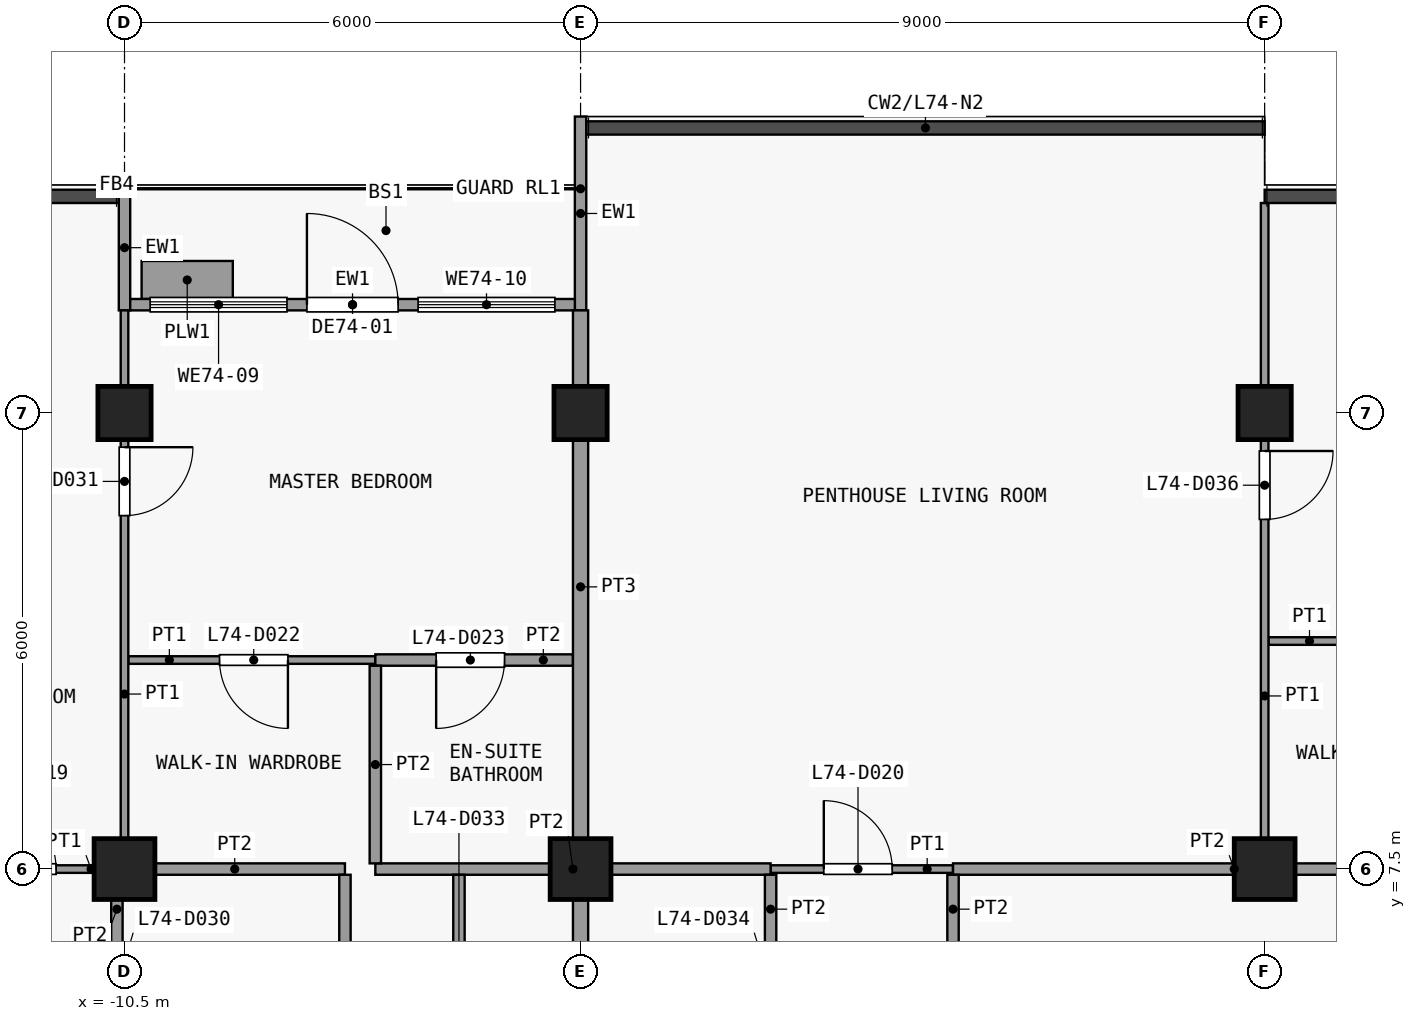
"""IFC4 building model, lengths in metres.
Left out: names, types, materials, properties, quantities, classifications, styles, units other than length and angle.
Written with IfcOpenShell. Run it as: python <this file> out.ifc"""

import sys

from ifc_helpers import new_model, si_unit, direction, frame, frame_2d, origin, origin_2d, place, context, subcontext, project, spatial, rectangle, extrude, element, fill, save


model = new_model("IFC4")
c1 = context("Model", 3, precision=1e-05, world=origin(), true_north=direction((0.0, 1.0)))
c2 = subcontext(c1, "Body", "Model", "MODEL_VIEW")
j1 = project(units=[si_unit("LENGTHUNIT", "METRE"), si_unit("PLANEANGLEUNIT", "RADIAN")], contexts=[c1])
p1 = place(None, origin())
s1 = spatial("IfcSite", under=j1, at=p1, CompositionType="ELEMENT")
p2 = place(p1, origin())
s2 = spatial("IfcBuilding", under=s1, at=p2, CompositionType="ELEMENT")
p3 = place(p2, frame((0.0, 0.0, 291.5)))
s3 = spatial("IfcBuildingStorey", under=s2, at=p3, CompositionType="ELEMENT", Elevation=291.5)
p4 = place(p3, frame((-10.5, 7.5, 0.0), z_axis=(0.0, 0.0, 1.0), x_axis=(1.0, 0.0, 0.0)))
e1 = element("IfcColumn", 1, at=p4, inside=s3, PredefinedType="COLUMN", context=c2, shape_type="SweptSolid", body=[
    extrude(rectangle(XDim=0.8, YDim=0.8, at=origin_2d()), origin(), (0.0, 0.0, 1.0), 3.6),
])
p5 = place(p3, frame((-10.5, 13.5, 0.0), z_axis=(0.0, 0.0, 1.0), x_axis=(1.0, 0.0, 0.0)))
e2 = element("IfcColumn", 2, at=p5, inside=s3, PredefinedType="COLUMN", context=c2, shape_type="SweptSolid", body=[
    extrude(rectangle(XDim=0.7, YDim=0.7, at=origin_2d()), origin(), (0.0, 0.0, 1.0), 3.6),
])
p6 = place(p3, frame((-4.5, 7.5, 0.0), z_axis=(0.0, 0.0, 1.0), x_axis=(1.0, 0.0, 0.0)))
e3 = element("IfcColumn", 3, at=p6, inside=s3, PredefinedType="COLUMN", context=c2, shape_type="SweptSolid", body=[
    extrude(rectangle(XDim=0.8, YDim=0.8, at=origin_2d()), origin(), (0.0, 0.0, 1.0), 3.6),
])
p7 = place(p3, frame((-4.5, 13.5, 0.0), z_axis=(0.0, 0.0, 1.0), x_axis=(1.0, 0.0, 0.0)))
e4 = element("IfcColumn", 4, at=p7, inside=s3, PredefinedType="COLUMN", context=c2, shape_type="SweptSolid", body=[
    extrude(rectangle(XDim=0.7, YDim=0.7, at=origin_2d()), origin(), (0.0, 0.0, 1.0), 3.6),
])
p8 = place(p3, frame((4.5, 7.5, 0.0), z_axis=(0.0, 0.0, 1.0), x_axis=(1.0, 0.0, 0.0)))
e5 = element("IfcColumn", 5, at=p8, inside=s3, PredefinedType="COLUMN", context=c2, shape_type="SweptSolid", body=[
    extrude(rectangle(XDim=0.8, YDim=0.8, at=origin_2d()), origin(), (0.0, 0.0, 1.0), 3.6),
])
p9 = place(p3, frame((4.5, 13.5, 0.0), z_axis=(0.0, 0.0, 1.0), x_axis=(1.0, 0.0, 0.0)))
e6 = element("IfcColumn", 6, at=p9, inside=s3, PredefinedType="COLUMN", context=c2, shape_type="SweptSolid", body=[
    extrude(rectangle(XDim=0.7, YDim=0.7, at=origin_2d()), origin(), (0.0, 0.0, 1.0), 3.6),
])
p10 = place(p3, frame((-10.5, 14.85, 0.0), z_axis=(0.0, 0.0, 1.0), x_axis=(0.0, 1.0, 0.0)))
e7 = element("IfcWall", 7, at=p10, inside=s3, PredefinedType="SOLIDWALL", context=c2, shape_type="SweptSolid", body=[
    extrude(rectangle(XDim=1.65, YDim=0.15, at=frame_2d((0.825, 0.0))), origin(), (0.0, 0.0, 1.0), 3.3),
])
p11 = place(p3, frame((-4.5, 14.85, 0.0), z_axis=(0.0, 0.0, 1.0), x_axis=(0.0, 1.0, 0.0)))
e8 = element("IfcWall", 8, at=p11, inside=s3, PredefinedType="SOLIDWALL", context=c2, shape_type="SweptSolid", body=[
    extrude(rectangle(XDim=2.55, YDim=0.15, at=frame_2d((1.275, 0.0))), origin(), (0.0, 0.0, 1.0), 3.3),
])
p12 = place(p3, frame((-10.425, 14.925, 0.0), z_axis=(0.0, 0.0, 1.0), x_axis=(1.0, 0.0, 0.0)))
e9 = element("IfcWall", 9, at=p12, inside=s3, PredefinedType="SOLIDWALL", context=c2, shape_type="SweptSolid", body=[
    extrude(rectangle(XDim=5.85, YDim=0.15, at=frame_2d((2.925, 0.0))), origin(), (0.0, 0.0, 1.0), 3.3),
])
p13 = place(p12, frame((2.325, 0.0, 0.0)))
e10 = element("IfcOpeningElement", 10, at=p13, cuts=e9, PredefinedType="OPENING", context=c2, shape_type="SweptSolid", body=[
    extrude(rectangle(XDim=1.2, YDim=2.4, at=frame_2d((0.6, 1.2))), frame((0.0, 0.085, 0.0), z_axis=(0.0, -1.0, 0.0), x_axis=(1.0, 0.0, 0.0)), (0.0, 0.0, 1.0), 0.17),
])
p14 = place(p12, frame((0.262, 0.0, 0.9)))
e11 = element("IfcOpeningElement", 11, at=p14, cuts=e9, PredefinedType="OPENING", context=c2, shape_type="SweptSolid", body=[
    extrude(rectangle(XDim=1.8, YDim=2.1, at=frame_2d((0.9, 1.05))), frame((0.0, 0.085, 0.0), z_axis=(0.0, -1.0, 0.0), x_axis=(1.0, 0.0, 0.0)), (0.0, 0.0, 1.0), 0.17),
])
p15 = place(p12, frame((3.788, 0.0, 0.9)))
e12 = element("IfcOpeningElement", 12, at=p15, cuts=e9, PredefinedType="OPENING", context=c2, shape_type="SweptSolid", body=[
    extrude(rectangle(XDim=1.8, YDim=2.1, at=frame_2d((0.9, 1.05))), frame((0.0, 0.085, 0.0), z_axis=(0.0, -1.0, 0.0), x_axis=(1.0, 0.0, 0.0)), (0.0, 0.0, 1.0), 0.17),
])
p16 = place(p3, frame((-10.275, 15.25, 0.0), z_axis=(0.0, 0.0, 1.0), x_axis=(1.0, 0.0, 0.0)))
e13 = element("IfcWall", 13, at=p16, inside=s3, PredefinedType="USERDEFINED", context=c2, shape_type="SweptSolid", body=[
    extrude(rectangle(XDim=1.2, YDim=0.5, at=frame_2d((0.6, 0.0))), origin(), (0.0, 0.0, 1.0), 0.9),
])
p17 = place(p3, frame((-13.0, 7.5, 0.0), z_axis=(0.0, 0.0, 1.0), x_axis=(1.0, 0.0, 0.0)))
e14 = element("IfcWall", 14, at=p17, inside=s3, PredefinedType="PARTITIONING", context=c2, shape_type="SweptSolid", body=[
    extrude(rectangle(XDim=2.4, YDim=0.1, at=frame_2d((1.2, 0.0))), origin(), (0.0, 0.0, 1.0), 3.3),
])
p18 = place(p17, frame((0.7, 0.0, 0.0)))
e15 = element("IfcOpeningElement", 15, at=p18, cuts=e14, PredefinedType="OPENING", context=c2, shape_type="SweptSolid", body=[
    extrude(rectangle(XDim=0.9, YDim=2.1, at=frame_2d((0.45, 1.05))), frame((0.0, 0.06, 0.0), z_axis=(0.0, -1.0, 0.0), x_axis=(1.0, 0.0, 0.0)), (0.0, 0.0, 1.0), 0.12),
])
p19 = place(p3, frame((-2.0, 7.5, 0.0), z_axis=(0.0, 0.0, 1.0), x_axis=(1.0, 0.0, 0.0)))
e16 = element("IfcWall", 16, at=p19, inside=s3, PredefinedType="PARTITIONING", context=c2, shape_type="SweptSolid", body=[
    extrude(rectangle(XDim=2.4, YDim=0.1, at=frame_2d((1.2, 0.0))), origin(), (0.0, 0.0, 1.0), 3.3),
])
p20 = place(p19, frame((0.7, 0.0, 0.0)))
e17 = element("IfcOpeningElement", 17, at=p20, cuts=e16, PredefinedType="OPENING", context=c2, shape_type="SweptSolid", body=[
    extrude(rectangle(XDim=0.9, YDim=2.1, at=frame_2d((0.45, 1.05))), frame((0.0, 0.06, 0.0), z_axis=(0.0, -1.0, 0.0), x_axis=(1.0, 0.0, 0.0)), (0.0, 0.0, 1.0), 0.12),
])
p21 = place(p3, frame((-10.5, 7.5, 0.0), z_axis=(0.0, 0.0, 1.0), x_axis=(1.0, 0.0, 0.0)))
e18 = element("IfcWall", 18, at=p21, inside=s3, PredefinedType="PARTITIONING", context=c2, shape_type="SweptSolid", body=[
    extrude(rectangle(XDim=2.9, YDim=0.15, at=frame_2d((1.45, 0.0))), origin(), (0.0, 0.0, 1.0), 3.3),
])
p22 = place(p3, frame((-7.2, 7.5, 0.0), z_axis=(0.0, 0.0, 1.0), x_axis=(1.0, 0.0, 0.0)))
e19 = element("IfcWall", 19, at=p22, inside=s3, PredefinedType="PARTITIONING", context=c2, shape_type="SweptSolid", body=[
    extrude(rectangle(XDim=5.2, YDim=0.15, at=frame_2d((2.6, 0.0))), origin(), (0.0, 0.0, 1.0), 3.3),
])
p23 = place(p3, frame((0.4, 7.5, 0.0), z_axis=(0.0, 0.0, 1.0), x_axis=(1.0, 0.0, 0.0)))
e20 = element("IfcWall", 20, at=p23, inside=s3, PredefinedType="PARTITIONING", context=c2, shape_type="SweptSolid", body=[
    extrude(rectangle(XDim=7.4, YDim=0.15, at=frame_2d((3.7, 0.0))), origin(), (0.0, 0.0, 1.0), 3.3),
])
p24 = place(p3, frame((-10.45, 10.25, 0.0), z_axis=(0.0, 0.0, 1.0), x_axis=(1.0, 0.0, 0.0)))
e21 = element("IfcWall", 21, at=p24, inside=s3, PredefinedType="PARTITIONING", context=c2, shape_type="SweptSolid", body=[
    extrude(rectangle(XDim=3.25, YDim=0.1, at=frame_2d((1.625, 0.0))), origin(), (0.0, 0.0, 1.0), 3.3),
])
p25 = place(p24, frame((1.2, 0.0, 0.0)))
e22 = element("IfcOpeningElement", 22, at=p25, cuts=e21, PredefinedType="OPENING", context=c2, shape_type="SweptSolid", body=[
    extrude(rectangle(XDim=0.9, YDim=2.1, at=frame_2d((0.45, 1.05))), frame((0.0, 0.06, 0.0), z_axis=(0.0, -1.0, 0.0), x_axis=(1.0, 0.0, 0.0)), (0.0, 0.0, 1.0), 0.12),
])
p26 = place(p3, frame((-7.2, 10.25, 0.0), z_axis=(0.0, 0.0, 1.0), x_axis=(1.0, 0.0, 0.0)))
e23 = element("IfcWall", 23, at=p26, inside=s3, PredefinedType="PARTITIONING", context=c2, shape_type="SweptSolid", body=[
    extrude(rectangle(XDim=2.6, YDim=0.15, at=frame_2d((1.3, 0.0))), origin(), (0.0, 0.0, 1.0), 3.3),
])
p27 = place(p26, frame((0.8, 0.0, 0.0)))
e24 = element("IfcOpeningElement", 24, at=p27, cuts=e23, PredefinedType="OPENING", context=c2, shape_type="SweptSolid", body=[
    extrude(rectangle(XDim=0.9, YDim=2.1, at=frame_2d((0.45, 1.05))), frame((0.0, 0.085, 0.0), z_axis=(0.0, -1.0, 0.0), x_axis=(1.0, 0.0, 0.0)), (0.0, 0.0, 1.0), 0.17),
])
p28 = place(p3, frame((4.55, 10.5, 0.0), z_axis=(0.0, 0.0, 1.0), x_axis=(1.0, 0.0, 0.0)))
e25 = element("IfcWall", 25, at=p28, inside=s3, PredefinedType="PARTITIONING", context=c2, shape_type="SweptSolid", body=[
    extrude(rectangle(XDim=3.25, YDim=0.1, at=frame_2d((1.625, 0.0))), origin(), (0.0, 0.0, 1.0), 3.3),
])
p29 = place(p28, frame((1.2, 0.0, 0.0)))
e26 = element("IfcOpeningElement", 26, at=p29, cuts=e25, PredefinedType="OPENING", context=c2, shape_type="SweptSolid", body=[
    extrude(rectangle(XDim=0.9, YDim=2.1, at=frame_2d((0.45, 1.05))), frame((0.0, 0.06, 0.0), z_axis=(0.0, -1.0, 0.0), x_axis=(1.0, 0.0, 0.0)), (0.0, 0.0, 1.0), 0.12),
])
p30 = place(p3, frame((-10.6, 4.6, 0.0), z_axis=(0.0, 0.0, 1.0), x_axis=(0.0, 1.0, 0.0)))
e27 = element("IfcWall", 27, at=p30, inside=s3, PredefinedType="PARTITIONING", context=c2, shape_type="SweptSolid", body=[
    extrude(rectangle(XDim=2.825, YDim=0.15, at=frame_2d((1.413, 0.0))), origin(), (0.0, 0.0, 1.0), 3.3),
])
p31 = place(p30, frame((0.9, 0.0, 0.0)))
e28 = element("IfcOpeningElement", 28, at=p31, cuts=e27, PredefinedType="OPENING", context=c2, shape_type="SweptSolid", body=[
    extrude(rectangle(XDim=0.9, YDim=2.1, at=frame_2d((0.45, 1.05))), frame((0.0, 0.085, 0.0), z_axis=(0.0, -1.0, 0.0), x_axis=(1.0, 0.0, 0.0)), (0.0, 0.0, 1.0), 0.17),
])
p32 = place(p3, frame((-10.5, 7.575, 0.0), z_axis=(0.0, 0.0, 1.0), x_axis=(0.0, 1.0, 0.0)))
e29 = element("IfcWall", 29, at=p32, inside=s3, PredefinedType="PARTITIONING", context=c2, shape_type="SweptSolid", body=[
    extrude(rectangle(XDim=7.275, YDim=0.1, at=frame_2d((3.638, 0.0))), origin(), (0.0, 0.0, 1.0), 3.3),
])
p33 = place(p32, frame((4.575, 0.0, 0.0)))
e30 = element("IfcOpeningElement", 30, at=p33, cuts=e29, PredefinedType="OPENING", context=c2, shape_type="SweptSolid", body=[
    extrude(rectangle(XDim=0.9, YDim=2.1, at=frame_2d((0.45, 1.05))), frame((0.0, 0.06, 0.0), z_axis=(0.0, -1.0, 0.0), x_axis=(1.0, 0.0, 0.0)), (0.0, 0.0, 1.0), 0.12),
])
p34 = place(p3, frame((-7.6, 4.6, 0.0), z_axis=(0.0, 0.0, 1.0), x_axis=(0.0, 1.0, 0.0)))
e31 = element("IfcWall", 31, at=p34, inside=s3, PredefinedType="PARTITIONING", context=c2, shape_type="SweptSolid", body=[
    extrude(rectangle(XDim=2.825, YDim=0.15, at=frame_2d((1.413, 0.0))), origin(), (0.0, 0.0, 1.0), 3.3),
])
p35 = place(p34, frame((1.0, 0.0, 0.0)))
e32 = element("IfcOpeningElement", 32, at=p35, cuts=e31, PredefinedType="OPENING", context=c2, shape_type="SweptSolid", body=[
    extrude(rectangle(XDim=0.9, YDim=2.1, at=frame_2d((0.45, 1.05))), frame((0.0, 0.085, 0.0), z_axis=(0.0, -1.0, 0.0), x_axis=(1.0, 0.0, 0.0)), (0.0, 0.0, 1.0), 0.17),
])
p36 = place(p3, frame((-7.2, 7.575, 0.0), z_axis=(0.0, 0.0, 1.0), x_axis=(0.0, 1.0, 0.0)))
e33 = element("IfcWall", 33, at=p36, inside=s3, PredefinedType="PARTITIONING", context=c2, shape_type="SweptSolid", body=[
    extrude(rectangle(XDim=2.6, YDim=0.15, at=frame_2d((1.3, 0.0))), origin(), (0.0, 0.0, 1.0), 3.3),
])
p37 = place(p3, frame((-6.1, 4.6, 0.0), z_axis=(0.0, 0.0, 1.0), x_axis=(0.0, 1.0, 0.0)))
e34 = element("IfcWall", 34, at=p37, inside=s3, PredefinedType="PARTITIONING", context=c2, shape_type="SweptSolid", body=[
    extrude(rectangle(XDim=2.825, YDim=0.15, at=frame_2d((1.413, 0.0))), origin(), (0.0, 0.0, 1.0), 3.3),
])
p38 = place(p37, frame((1.0, 0.0, 0.0)))
e35 = element("IfcOpeningElement", 35, at=p38, cuts=e34, PredefinedType="OPENING", context=c2, shape_type="SweptSolid", body=[
    extrude(rectangle(XDim=0.9, YDim=2.1, at=frame_2d((0.45, 1.05))), frame((0.0, 0.085, 0.0), z_axis=(0.0, -1.0, 0.0), x_axis=(1.0, 0.0, 0.0)), (0.0, 0.0, 1.0), 0.17),
])
p39 = place(p3, frame((-4.5, 4.6, 0.0), z_axis=(0.0, 0.0, 1.0), x_axis=(0.0, 1.0, 0.0)))
e36 = element("IfcWall", 36, at=p39, inside=s3, PredefinedType="PARTITIONING", context=c2, shape_type="SweptSolid", body=[
    extrude(rectangle(XDim=2.825, YDim=0.2, at=frame_2d((1.413, 0.0))), origin(), (0.0, 0.0, 1.0), 3.3),
])
p40 = place(p3, frame((-4.5, 7.575, 0.0), z_axis=(0.0, 0.0, 1.0), x_axis=(0.0, 1.0, 0.0)))
e37 = element("IfcWall", 37, at=p40, inside=s3, PredefinedType="PARTITIONING", context=c2, shape_type="SweptSolid", body=[
    extrude(rectangle(XDim=7.275, YDim=0.2, at=frame_2d((3.638, 0.0))), origin(), (0.0, 0.0, 1.0), 3.3),
])
p41 = place(p3, frame((-2.0, 4.6, 0.0), z_axis=(0.0, 0.0, 1.0), x_axis=(0.0, 1.0, 0.0)))
e38 = element("IfcWall", 38, at=p41, inside=s3, PredefinedType="PARTITIONING", context=c2, shape_type="SweptSolid", body=[
    extrude(rectangle(XDim=2.825, YDim=0.15, at=frame_2d((1.413, 0.0))), origin(), (0.0, 0.0, 1.0), 3.3),
])
p42 = place(p41, frame((0.9, 0.0, 0.0)))
e39 = element("IfcOpeningElement", 39, at=p42, cuts=e38, PredefinedType="OPENING", context=c2, shape_type="SweptSolid", body=[
    extrude(rectangle(XDim=0.9, YDim=2.1, at=frame_2d((0.45, 1.05))), frame((0.0, 0.085, 0.0), z_axis=(0.0, -1.0, 0.0), x_axis=(1.0, 0.0, 0.0)), (0.0, 0.0, 1.0), 0.17),
])
p43 = place(p3, frame((0.4, 4.6, 0.0), z_axis=(0.0, 0.0, 1.0), x_axis=(0.0, 1.0, 0.0)))
e40 = element("IfcWall", 40, at=p43, inside=s3, PredefinedType="PARTITIONING", context=c2, shape_type="SweptSolid", body=[
    extrude(rectangle(XDim=2.825, YDim=0.15, at=frame_2d((1.413, 0.0))), origin(), (0.0, 0.0, 1.0), 3.3),
])
p44 = place(p43, frame((0.9, 0.0, 0.0)))
e41 = element("IfcOpeningElement", 41, at=p44, cuts=e40, PredefinedType="OPENING", context=c2, shape_type="SweptSolid", body=[
    extrude(rectangle(XDim=0.9, YDim=2.1, at=frame_2d((0.45, 1.05))), frame((0.0, 0.085, 0.0), z_axis=(0.0, -1.0, 0.0), x_axis=(1.0, 0.0, 0.0)), (0.0, 0.0, 1.0), 0.17),
])
p45 = place(p3, frame((4.5, 7.575, 0.0), z_axis=(0.0, 0.0, 1.0), x_axis=(0.0, 1.0, 0.0)))
e42 = element("IfcWall", 42, at=p45, inside=s3, PredefinedType="PARTITIONING", context=c2, shape_type="SweptSolid", body=[
    extrude(rectangle(XDim=8.688, YDim=0.1, at=frame_2d((4.344, 0.0))), origin(), (0.0, 0.0, 1.0), 3.3),
])
p46 = place(p45, frame((4.525, 0.0, 0.0)))
e43 = element("IfcOpeningElement", 43, at=p46, cuts=e42, PredefinedType="OPENING", context=c2, shape_type="SweptSolid", body=[
    extrude(rectangle(XDim=0.9, YDim=2.1, at=frame_2d((0.45, 1.05))), frame((0.0, 0.06, 0.0), z_axis=(0.0, -1.0, 0.0), x_axis=(1.0, 0.0, 0.0)), (0.0, 0.0, 1.0), 0.12),
])
p47 = place(p13, origin())
e44 = element("IfcDoor", 44, at=p47, inside=s3, OperationType="SINGLE_SWING_LEFT", PredefinedType="DOOR", context=c2, shape_type="SweptSolid", body=[
    extrude(rectangle(XDim=1.2, YDim=2.4, at=frame_2d((0.6, 1.2))), frame((0.0, 0.025, 0.0), z_axis=(0.0, -1.0, 0.0), x_axis=(1.0, 0.0, 0.0)), (0.0, 0.0, 1.0), 0.05),
])
fill(e10, e44)
p48 = place(p14, origin())
e45 = element("IfcWindow", 45, at=p48, inside=s3, PartitioningType="SINGLE_PANEL", PredefinedType="WINDOW", context=c2, shape_type="SweptSolid", body=[
    extrude(rectangle(XDim=1.8, YDim=2.1, at=frame_2d((0.9, 1.05))), frame((0.0, 0.03, 0.0), z_axis=(0.0, -1.0, 0.0), x_axis=(1.0, 0.0, 0.0)), (0.0, 0.0, 1.0), 0.06),
])
fill(e11, e45)
p49 = place(p15, origin())
e46 = element("IfcWindow", 46, at=p49, inside=s3, PartitioningType="SINGLE_PANEL", PredefinedType="WINDOW", context=c2, shape_type="SweptSolid", body=[
    extrude(rectangle(XDim=1.8, YDim=2.1, at=frame_2d((0.9, 1.05))), frame((0.0, 0.03, 0.0), z_axis=(0.0, -1.0, 0.0), x_axis=(1.0, 0.0, 0.0)), (0.0, 0.0, 1.0), 0.06),
])
fill(e12, e46)
p50 = place(p18, origin())
e47 = element("IfcDoor", 47, at=p50, inside=s3, OperationType="SINGLE_SWING_RIGHT", PredefinedType="DOOR", context=c2, shape_type="SweptSolid", body=[
    extrude(rectangle(XDim=0.9, YDim=2.1, at=frame_2d((0.45, 1.05))), frame((0.0, 0.025, 0.0), z_axis=(0.0, -1.0, 0.0), x_axis=(1.0, 0.0, 0.0)), (0.0, 0.0, 1.0), 0.05),
])
fill(e15, e47)
p51 = place(p20, origin())
e48 = element("IfcDoor", 48, at=p51, inside=s3, OperationType="SINGLE_SWING_RIGHT", PredefinedType="DOOR", context=c2, shape_type="SweptSolid", body=[
    extrude(rectangle(XDim=0.9, YDim=2.1, at=frame_2d((0.45, 1.05))), frame((0.0, 0.025, 0.0), z_axis=(0.0, -1.0, 0.0), x_axis=(1.0, 0.0, 0.0)), (0.0, 0.0, 1.0), 0.05),
])
fill(e17, e48)
p52 = place(p25, origin())
e49 = element("IfcDoor", 49, at=p52, inside=s3, OperationType="SINGLE_SWING_RIGHT", PredefinedType="DOOR", context=c2, shape_type="SweptSolid", body=[
    extrude(rectangle(XDim=0.9, YDim=2.1, at=frame_2d((0.45, 1.05))), frame((0.0, 0.025, 0.0), z_axis=(0.0, -1.0, 0.0), x_axis=(1.0, 0.0, 0.0)), (0.0, 0.0, 1.0), 0.05),
])
fill(e22, e49)
p53 = place(p27, origin())
e50 = element("IfcDoor", 50, at=p53, inside=s3, OperationType="SINGLE_SWING_LEFT", PredefinedType="DOOR", context=c2, shape_type="SweptSolid", body=[
    extrude(rectangle(XDim=0.9, YDim=2.1, at=frame_2d((0.45, 1.05))), frame((0.0, 0.025, 0.0), z_axis=(0.0, -1.0, 0.0), x_axis=(1.0, 0.0, 0.0)), (0.0, 0.0, 1.0), 0.05),
])
fill(e24, e50)
p54 = place(p33, origin())
e51 = element("IfcDoor", 51, at=p54, inside=s3, OperationType="SINGLE_SWING_RIGHT", PredefinedType="DOOR", context=c2, shape_type="SweptSolid", body=[
    extrude(rectangle(XDim=0.9, YDim=2.1, at=frame_2d((0.45, 1.05))), frame((0.0, 0.025, 0.0), z_axis=(0.0, -1.0, 0.0), x_axis=(1.0, 0.0, 0.0)), (0.0, 0.0, 1.0), 0.05),
])
fill(e30, e51)
p55 = place(p46, origin())
e52 = element("IfcDoor", 52, at=p55, inside=s3, OperationType="SINGLE_SWING_RIGHT", PredefinedType="DOOR", context=c2, shape_type="SweptSolid", body=[
    extrude(rectangle(XDim=0.9, YDim=2.1, at=frame_2d((0.45, 1.05))), frame((0.0, 0.025, 0.0), z_axis=(0.0, -1.0, 0.0), x_axis=(1.0, 0.0, 0.0)), (0.0, 0.0, 1.0), 0.05),
])
fill(e43, e52)
save(model, sys.argv[1])
